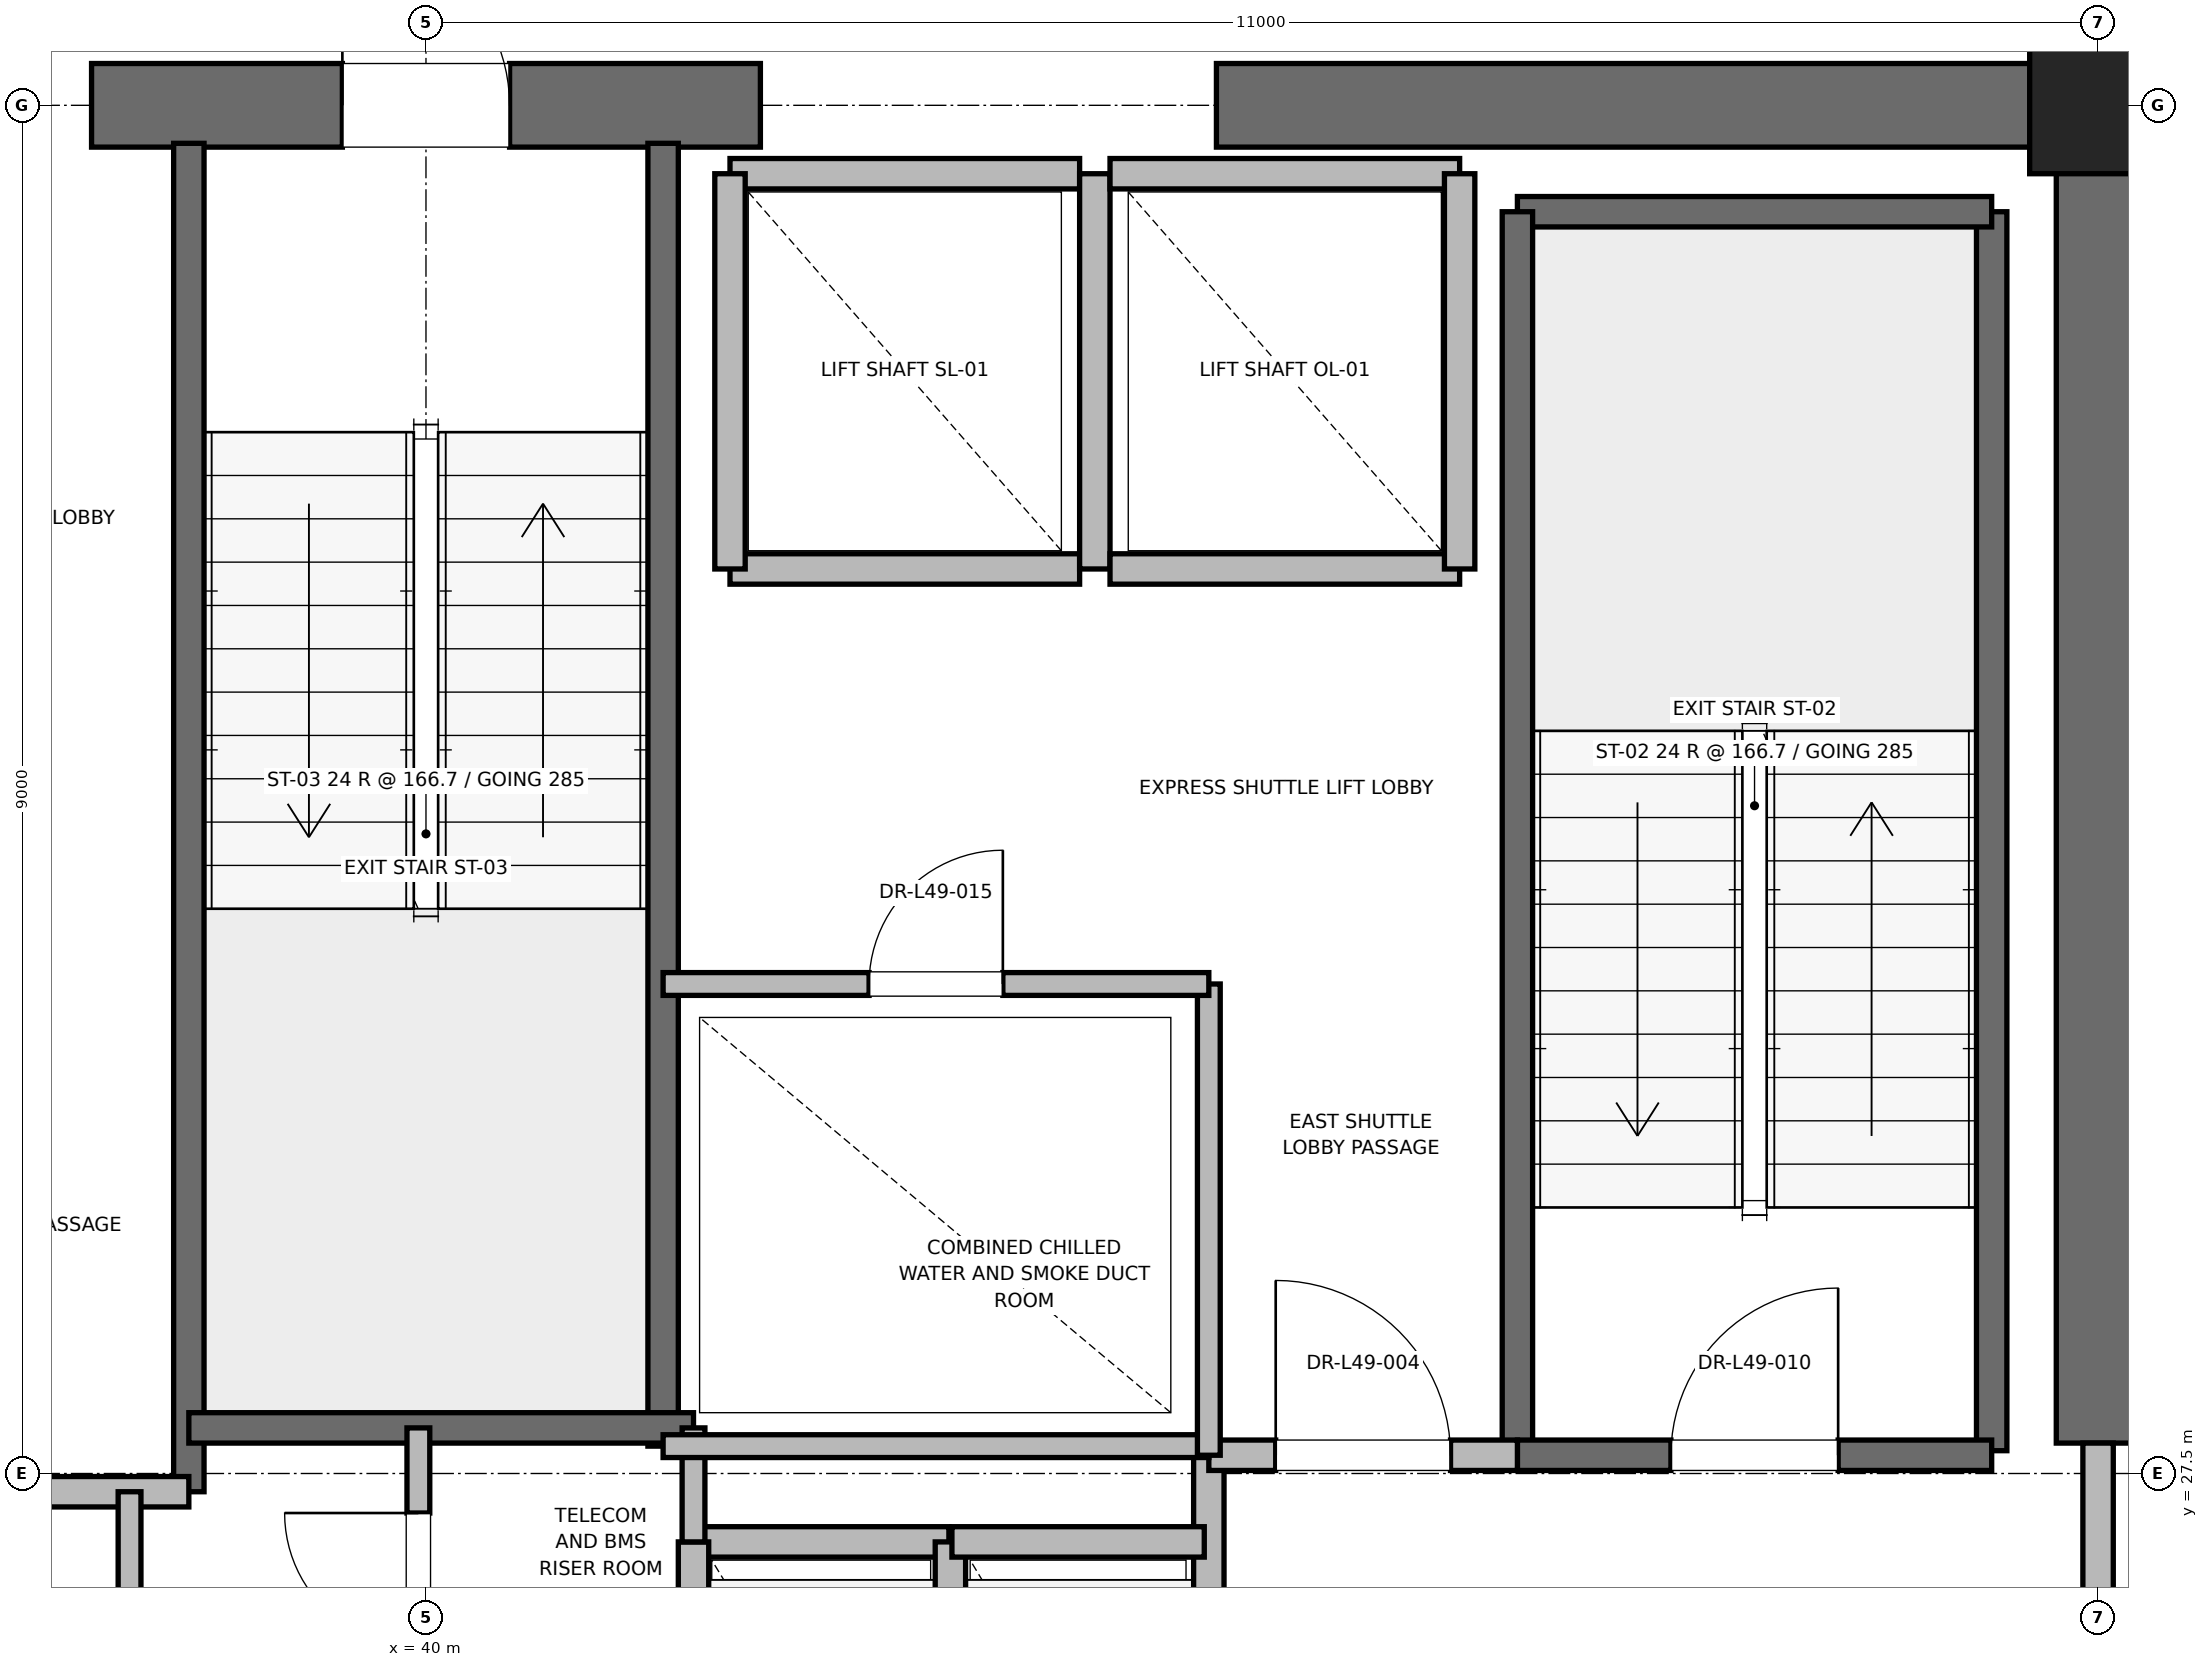
"""IFC4 building model, lengths in metres.
Left out: names, types, materials, properties, quantities, classifications, styles, units other than length and angle.
Written with IfcOpenShell. Run it as: python <this file> out.ifc"""

import sys

from ifc_helpers import new_model, si_unit, direction, frame, frame_2d, origin, origin_2d, place, context, subcontext, project, spatial, rectangle, extrude, element, fill, save


model = new_model("IFC4")
c1 = context("Model", 3, precision=1e-05, world=origin(), true_north=direction((0.0, 1.0)))
c2 = subcontext(c1, "Body", "Model", "MODEL_VIEW")
j1 = project(units=[si_unit("LENGTHUNIT", "METRE"), si_unit("PLANEANGLEUNIT", "RADIAN")], contexts=[c1])
p1 = place(None, origin())
s1 = spatial("IfcSite", under=j1, at=p1, CompositionType="ELEMENT")
p2 = place(p1, origin())
s2 = spatial("IfcBuilding", under=s1, at=p2, CompositionType="ELEMENT")
p3 = place(p2, frame((0.0, 0.0, 213.2)))
s3 = spatial("IfcBuildingStorey", under=s2, at=p3, CompositionType="ELEMENT", Elevation=213.2)
p4 = place(p3, frame((51.0, 36.5, 0.0), z_axis=(0.0, 0.0, 1.0), x_axis=(1.0, 0.0, 0.0)))
e1 = element("IfcColumn", 1, at=p4, inside=s3, PredefinedType="PILASTER", context=c2, shape_type="SweptSolid", body=[
    extrude(rectangle(XDim=0.9, YDim=0.9, at=origin_2d()), origin(), (0.0, 0.0, 1.0), 4.0),
])
p5 = place(p3, frame((37.8, 36.5, 0.0), z_axis=(0.0, 0.0, 1.0), x_axis=(1.0, 0.0, 0.0)))
e2 = element("IfcWall", 2, at=p5, inside=s3, PredefinedType="SHEAR", context=c2, shape_type="SweptSolid", body=[
    extrude(rectangle(XDim=4.4, YDim=0.55, at=frame_2d((2.2, 0.0))), origin(), (0.0, 0.0, 1.0), 3.775),
])
p6 = place(p5, frame((1.65, 0.0, 0.0)))
e3 = element("IfcOpeningElement", 3, at=p6, cuts=e2, PredefinedType="OPENING", context=c2, shape_type="SweptSolid", body=[
    extrude(rectangle(XDim=1.1, YDim=2.15, at=frame_2d((0.55, 1.075))), frame((0.0, 0.275, 0.0), z_axis=(0.0, -1.0, 0.0), x_axis=(1.0, 0.0, 0.0)), (0.0, 0.0, 1.0), 0.55),
])
p7 = place(p3, frame((45.2, 36.5, 0.0), z_axis=(0.0, 0.0, 1.0), x_axis=(1.0, 0.0, 0.0)))
e4 = element("IfcWall", 4, at=p7, inside=s3, PredefinedType="SHEAR", context=c2, shape_type="SweptSolid", body=[
    extrude(rectangle(XDim=5.8, YDim=0.55, at=frame_2d((2.9, 0.0))), origin(), (0.0, 0.0, 1.0), 3.775),
])
p8 = place(p3, frame((51.0, 27.7, 0.0), z_axis=(0.0, 0.0, 1.0), x_axis=(0.0, 1.0, 0.0)))
e5 = element("IfcWall", 5, at=p8, inside=s3, PredefinedType="SHEAR", context=c2, shape_type="SweptSolid", body=[
    extrude(rectangle(XDim=8.8, YDim=0.55, at=frame_2d((4.4, 0.0))), origin(), (0.0, 0.0, 1.0), 3.775),
])
p9 = place(p3, frame((50.3, 27.65, 0.0), z_axis=(0.0, 0.0, 1.0), x_axis=(0.0, 1.0, 0.0)))
e6 = element("IfcWall", 6, at=p9, inside=s3, PredefinedType="SOLIDWALL", context=c2, shape_type="SweptSolid", body=[
    extrude(rectangle(XDim=8.15, YDim=0.2, at=frame_2d((4.075, 0.0))), origin(), (0.0, 0.0, 1.0), 3.775),
])
p10 = place(p3, frame((47.18, 35.8, 0.0), z_axis=(0.0, 0.0, 1.0), x_axis=(1.0, 0.0, 0.0)))
e7 = element("IfcWall", 7, at=p10, inside=s3, PredefinedType="SOLIDWALL", context=c2, shape_type="SweptSolid", body=[
    extrude(rectangle(XDim=3.12, YDim=0.2, at=frame_2d((1.56, 0.0))), origin(), (0.0, 0.0, 1.0), 3.775),
])
p11 = place(p3, frame((47.18, 27.62, 0.0), z_axis=(0.0, 0.0, 1.0), x_axis=(0.0, 1.0, 0.0)))
e8 = element("IfcWall", 8, at=p11, inside=s3, PredefinedType="SOLIDWALL", context=c2, shape_type="SweptSolid", body=[
    extrude(rectangle(XDim=8.18, YDim=0.2, at=frame_2d((4.09, 0.0))), origin(), (0.0, 0.0, 1.0), 3.775),
])
p12 = place(p3, frame((47.18, 27.62, 0.0), z_axis=(0.0, 0.0, 1.0), x_axis=(1.0, 0.0, 0.0)))
e9 = element("IfcWall", 9, at=p12, inside=s3, PredefinedType="SOLIDWALL", context=c2, shape_type="SweptSolid", body=[
    extrude(rectangle(XDim=3.12, YDim=0.2, at=frame_2d((1.56, 0.0))), origin(), (0.0, 0.0, 1.0), 3.775),
])
p13 = place(p12, frame((1.01, 0.0, 0.0)))
e10 = element("IfcOpeningElement", 10, at=p13, cuts=e9, PredefinedType="OPENING", context=c2, shape_type="SweptSolid", body=[
    extrude(rectangle(XDim=1.1, YDim=2.15, at=frame_2d((0.55, 1.075))), frame((0.0, 0.1, 0.0), z_axis=(0.0, -1.0, 0.0), x_axis=(1.0, 0.0, 0.0)), (0.0, 0.0, 1.0), 0.2),
])
p14 = place(p3, frame((38.44, 27.38, 0.0), z_axis=(0.0, 0.0, 1.0), x_axis=(0.0, 1.0, 0.0)))
e11 = element("IfcWall", 11, at=p14, inside=s3, PredefinedType="SOLIDWALL", context=c2, shape_type="SweptSolid", body=[
    extrude(rectangle(XDim=8.87, YDim=0.2, at=frame_2d((4.435, 0.0))), origin(), (0.0, 0.0, 1.0), 3.775),
])
p15 = place(p3, frame((41.56, 27.68, 0.0), z_axis=(0.0, 0.0, 1.0), x_axis=(0.0, 1.0, 0.0)))
e12 = element("IfcWall", 12, at=p15, inside=s3, PredefinedType="SOLIDWALL", context=c2, shape_type="SweptSolid", body=[
    extrude(rectangle(XDim=8.57, YDim=0.2, at=frame_2d((4.285, 0.0))), origin(), (0.0, 0.0, 1.0), 3.775),
])
p16 = place(p3, frame((38.44, 27.8, 0.0), z_axis=(0.0, 0.0, 1.0), x_axis=(1.0, 0.0, 0.0)))
e13 = element("IfcWall", 13, at=p16, inside=s3, PredefinedType="SOLIDWALL", context=c2, shape_type="SweptSolid", body=[
    extrude(rectangle(XDim=3.32, YDim=0.2, at=frame_2d((1.66, 0.0))), origin(), (0.0, 0.0, 1.0), 3.775),
])
p17 = place(p3, frame((32.82, 27.38, 0.0), z_axis=(0.0, 0.0, 1.0), x_axis=(1.0, 0.0, 0.0)))
e14 = element("IfcWall", 14, at=p17, inside=s3, PredefinedType="PARTITIONING", context=c2, shape_type="SweptSolid", body=[
    extrude(rectangle(XDim=5.62, YDim=0.2, at=frame_2d((2.81, 0.0))), origin(), (0.0, 0.0, 1.0), 3.775),
])
p18 = place(p3, frame((45.15, 24.25, 0.0), z_axis=(0.0, 0.0, 1.0), x_axis=(0.0, 1.0, 0.0)))
e15 = element("IfcWall", 15, at=p18, inside=s3, PredefinedType="PARTITIONING", context=c2, shape_type="SweptSolid", body=[
    extrude(rectangle(XDim=3.37, YDim=0.2, at=frame_2d((1.685, 0.0))), origin(), (0.0, 0.0, 1.0), 3.775),
])
p19 = place(p3, frame((45.15, 27.62, 0.0), z_axis=(0.0, 0.0, 1.0), x_axis=(1.0, 0.0, 0.0)))
e16 = element("IfcWall", 16, at=p19, inside=s3, PredefinedType="PARTITIONING", context=c2, shape_type="SweptSolid", body=[
    extrude(rectangle(XDim=2.03, YDim=0.2, at=frame_2d((1.015, 0.0))), origin(), (0.0, 0.0, 1.0), 3.775),
])
p20 = place(p19, frame((0.44, 0.0, 0.0)))
e17 = element("IfcOpeningElement", 17, at=p20, cuts=e16, PredefinedType="OPENING", context=c2, shape_type="SweptSolid", body=[
    extrude(rectangle(XDim=1.15, YDim=2.2, at=frame_2d((0.575, 1.1))), frame((0.0, 0.1, 0.0), z_axis=(0.0, -1.0, 0.0), x_axis=(1.0, 0.0, 0.0)), (0.0, 0.0, 1.0), 0.2),
])
p21 = place(p3, frame((51.0, 24.3, 0.0), z_axis=(0.0, 0.0, 1.0), x_axis=(0.0, 1.0, 0.0)))
e18 = element("IfcWall", 18, at=p21, inside=s3, PredefinedType="PARTITIONING", context=c2, shape_type="SweptSolid", body=[
    extrude(rectangle(XDim=3.4, YDim=0.2, at=frame_2d((1.7, 0.0))), origin(), (0.0, 0.0, 1.0), 2.755),
])
p22 = place(p21, frame((1.125, 0.0, 0.0)))
e19 = element("IfcOpeningElement", 19, at=p22, cuts=e18, PredefinedType="OPENING", context=c2, shape_type="SweptSolid", body=[
    extrude(rectangle(XDim=1.15, YDim=2.2, at=frame_2d((0.575, 1.1))), frame((0.0, 0.1, 0.0), z_axis=(0.0, -1.0, 0.0), x_axis=(1.0, 0.0, 0.0)), (0.0, 0.0, 1.0), 0.2),
])
p23 = place(p3, frame((43.44, 27.05, 0.0), z_axis=(0.0, 0.0, 1.0), x_axis=(-1.0, 0.0, 0.0)))
e20 = element("IfcWall", 20, at=p23, inside=s3, PredefinedType="SOLIDWALL", context=c2, shape_type="SweptSolid", body=[
    extrude(rectangle(XDim=1.68, YDim=0.2, at=frame_2d((0.84, 0.0))), origin(), (0.0, 0.0, 1.0), 3.775),
])
for number, where, z_axis, x_axis in (
    (21, (41.76, 27.05, 0.0), (0.0, 0.0, 1.0), (0.0, -1.0, 0.0)),
    (22, (43.45, 24.45, 0.0), (0.0, 0.0, 1.0), (0.0, 1.0, 0.0)),
):
    element("IfcWall", number, at=place(p3, frame(where, z_axis=z_axis, x_axis=x_axis)), inside=s3, PredefinedType="SOLIDWALL", context=c2, shape_type="SweptSolid", body=[
        extrude(rectangle(XDim=2.6, YDim=0.2, at=frame_2d((1.3, 0.0))), origin(), (0.0, 0.0, 1.0), 3.775),
    ])
p24 = place(p3, frame((45.12, 27.05, 0.0), z_axis=(0.0, 0.0, 1.0), x_axis=(-1.0, 0.0, 0.0)))
e23 = element("IfcWall", 23, at=p24, inside=s3, PredefinedType="SOLIDWALL", context=c2, shape_type="SweptSolid", body=[
    extrude(rectangle(XDim=1.66, YDim=0.2, at=frame_2d((0.83, 0.0))), origin(), (0.0, 0.0, 1.0), 3.775),
])
p25 = place(p3, frame((42.0, 33.45, 0.0), z_axis=(0.0, 0.0, 1.0), x_axis=(1.0, 0.0, 0.0)))
e24 = element("IfcWall", 24, at=p25, inside=s3, PredefinedType="SOLIDWALL", context=c2, shape_type="SweptSolid", body=[
    extrude(rectangle(XDim=2.3, YDim=0.2, at=frame_2d((1.15, 0.0))), origin(), (0.0, 0.0, 1.0), 3.775),
])
p26 = place(p3, frame((44.3, 36.05, 0.0), z_axis=(0.0, 0.0, 1.0), x_axis=(-1.0, 0.0, 0.0)))
e25 = element("IfcWall", 25, at=p26, inside=s3, PredefinedType="SOLIDWALL", context=c2, shape_type="SweptSolid", body=[
    extrude(rectangle(XDim=2.3, YDim=0.2, at=frame_2d((1.15, 0.0))), origin(), (0.0, 0.0, 1.0), 2.755),
])
for number, where, z_axis, x_axis in (
    (26, (42.0, 36.05, 0.0), (0.0, 0.0, 1.0), (0.0, -1.0, 0.0)),
    (27, (44.4, 33.45, 0.0), (0.0, 0.0, 1.0), (0.0, 1.0, 0.0)),
):
    element("IfcWall", number, at=place(p3, frame(where, z_axis=z_axis, x_axis=x_axis)), inside=s3, PredefinedType="SOLIDWALL", context=c2, shape_type="SweptSolid", body=[
        extrude(rectangle(XDim=2.6, YDim=0.2, at=frame_2d((1.3, 0.0))), origin(), (0.0, 0.0, 1.0), 2.755),
    ])
p27 = place(p3, frame((44.5, 33.45, 0.0), z_axis=(0.0, 0.0, 1.0), x_axis=(1.0, 0.0, 0.0)))
e28 = element("IfcWall", 28, at=p27, inside=s3, PredefinedType="SOLIDWALL", context=c2, shape_type="SweptSolid", body=[
    extrude(rectangle(XDim=2.3, YDim=0.2, at=frame_2d((1.15, 0.0))), origin(), (0.0, 0.0, 1.0), 3.775),
])
p28 = place(p3, frame((46.8, 36.05, 0.0), z_axis=(0.0, 0.0, 1.0), x_axis=(-1.0, 0.0, 0.0)))
e29 = element("IfcWall", 29, at=p28, inside=s3, PredefinedType="SOLIDWALL", context=c2, shape_type="SweptSolid", body=[
    extrude(rectangle(XDim=2.3, YDim=0.2, at=frame_2d((1.15, 0.0))), origin(), (0.0, 0.0, 1.0), 2.755),
])
p29 = place(p3, frame((46.8, 33.45, 0.0), z_axis=(0.0, 0.0, 1.0), x_axis=(0.0, 1.0, 0.0)))
e30 = element("IfcWall", 30, at=p29, inside=s3, PredefinedType="SOLIDWALL", context=c2, shape_type="SweptSolid", body=[
    extrude(rectangle(XDim=2.6, YDim=0.2, at=frame_2d((1.3, 0.0))), origin(), (0.0, 0.0, 1.0), 3.775),
])
p30 = place(p3, frame((41.76, 27.05, 0.0), z_axis=(0.0, 0.0, 1.0), x_axis=(0.0, 1.0, 0.0)))
e31 = element("IfcWall", 31, at=p30, inside=s3, PredefinedType="PARTITIONING", context=c2, shape_type="SweptSolid", body=[
    extrude(rectangle(XDim=0.75, YDim=0.15, at=frame_2d((0.375, 0.0))), origin(), (0.0, 0.0, 1.0), 2.85),
])
p31 = place(p3, frame((39.95, 25.8, 0.0), z_axis=(0.0, 0.0, 1.0), x_axis=(0.0, 1.0, 0.0)))
e32 = element("IfcWall", 32, at=p31, inside=s3, PredefinedType="PARTITIONING", context=c2, shape_type="SweptSolid", body=[
    extrude(rectangle(XDim=2.0, YDim=0.15, at=frame_2d((1.0, 0.0))), origin(), (0.0, 0.0, 1.0), 2.85),
])
p32 = place(p31, frame((0.56, 0.0, 0.0)))
e33 = element("IfcOpeningElement", 33, at=p32, cuts=e32, PredefinedType="OPENING", context=c2, shape_type="SweptSolid", body=[
    extrude(rectangle(XDim=0.88, YDim=2.1, at=frame_2d((0.44, 1.05))), frame((0.0, 0.075, 0.0), z_axis=(0.0, -1.0, 0.0), x_axis=(1.0, 0.0, 0.0)), (0.0, 0.0, 1.0), 0.15),
])
p33 = place(p3, frame((38.05, 18.6, 0.0), z_axis=(0.0, 0.0, 1.0), x_axis=(0.0, 1.0, 0.0)))
e34 = element("IfcWall", 34, at=p33, inside=s3, PredefinedType="PARTITIONING", context=c2, shape_type="SweptSolid", body=[
    extrude(rectangle(XDim=8.78, YDim=0.15, at=frame_2d((4.39, 0.0))), origin(), (0.0, 0.0, 1.0), 2.755),
])
p34 = place(p33, frame((3.89, 0.0, 0.0)))
e35 = element("IfcOpeningElement", 35, at=p34, cuts=e34, PredefinedType="OPENING", context=c2, shape_type="SweptSolid", body=[
    extrude(rectangle(XDim=1.0, YDim=2.15, at=frame_2d((0.5, 1.075))), frame((0.0, 0.075, 0.0), z_axis=(0.0, -1.0, 0.0), x_axis=(1.0, 0.0, 0.0)), (0.0, 0.0, 1.0), 0.15),
])
p35 = place(p3, frame((41.56, 27.68, 0.0), z_axis=(0.0, 0.0, 1.0), x_axis=(1.0, 0.0, 0.0)))
e36 = element("IfcWall", 36, at=p35, inside=s3, PredefinedType="PARTITIONING", context=c2, shape_type="SweptSolid", body=[
    extrude(rectangle(XDim=3.59, YDim=0.15, at=frame_2d((1.795, 0.0))), origin(), (0.0, 0.0, 1.0), 2.85),
])
p36 = place(p3, frame((45.15, 27.62, 0.0), z_axis=(0.0, 0.0, 1.0), x_axis=(0.0, 1.0, 0.0)))
e37 = element("IfcWall", 37, at=p36, inside=s3, PredefinedType="PARTITIONING", context=c2, shape_type="SweptSolid", body=[
    extrude(rectangle(XDim=3.1, YDim=0.15, at=frame_2d((1.55, 0.0))), origin(), (0.0, 0.0, 1.0), 2.85),
])
p37 = place(p3, frame((41.56, 30.72, 0.0), z_axis=(0.0, 0.0, 1.0), x_axis=(1.0, 0.0, 0.0)))
e38 = element("IfcWall", 38, at=p37, inside=s3, PredefinedType="PARTITIONING", context=c2, shape_type="SweptSolid", body=[
    extrude(rectangle(XDim=3.59, YDim=0.15, at=frame_2d((1.795, 0.0))), origin(), (0.0, 0.0, 1.0), 2.85),
])
p38 = place(p37, frame((1.355, 0.0, 0.0)))
e39 = element("IfcOpeningElement", 39, at=p38, cuts=e38, PredefinedType="OPENING", context=c2, shape_type="SweptSolid", body=[
    extrude(rectangle(XDim=0.88, YDim=2.1, at=frame_2d((0.44, 1.05))), frame((0.0, 0.075, 0.0), z_axis=(0.0, -1.0, 0.0), x_axis=(1.0, 0.0, 0.0)), (0.0, 0.0, 1.0), 0.15),
])
p39 = place(p13, origin())
e40 = element("IfcDoor", 40, at=p39, inside=s3, OperationType="SINGLE_SWING_RIGHT", PredefinedType="DOOR", context=c2, shape_type="SweptSolid", body=[
    extrude(rectangle(XDim=1.1, YDim=2.15, at=frame_2d((0.55, 1.075))), frame((0.0, 0.025, 0.0), z_axis=(0.0, -1.0, 0.0), x_axis=(1.0, 0.0, 0.0)), (0.0, 0.0, 1.0), 0.05),
])
fill(e10, e40)
p40 = place(p6, origin())
e41 = element("IfcDoor", 41, at=p40, inside=s3, OperationType="SINGLE_SWING_LEFT", PredefinedType="DOOR", context=c2, shape_type="SweptSolid", body=[
    extrude(rectangle(XDim=1.1, YDim=2.15, at=frame_2d((0.55, 1.075))), frame((0.0, 0.025, 0.0), z_axis=(0.0, -1.0, 0.0), x_axis=(1.0, 0.0, 0.0)), (0.0, 0.0, 1.0), 0.05),
])
fill(e3, e41)
p41 = place(p20, origin())
e42 = element("IfcDoor", 42, at=p41, inside=s3, OperationType="SINGLE_SWING_LEFT", PredefinedType="DOOR", context=c2, shape_type="SweptSolid", body=[
    extrude(rectangle(XDim=1.15, YDim=2.2, at=frame_2d((0.575, 1.1))), frame((0.0, 0.025, 0.0), z_axis=(0.0, -1.0, 0.0), x_axis=(1.0, 0.0, 0.0)), (0.0, 0.0, 1.0), 0.05),
])
fill(e17, e42)
p42 = place(p32, origin())
e43 = element("IfcDoor", 43, at=p42, inside=s3, OperationType="SINGLE_SWING_RIGHT", PredefinedType="DOOR", context=c2, shape_type="SweptSolid", body=[
    extrude(rectangle(XDim=0.88, YDim=2.1, at=frame_2d((0.44, 1.05))), frame((0.0, 0.025, 0.0), z_axis=(0.0, -1.0, 0.0), x_axis=(1.0, 0.0, 0.0)), (0.0, 0.0, 1.0), 0.05),
])
fill(e33, e43)
p43 = place(p38, origin())
e44 = element("IfcDoor", 44, at=p43, inside=s3, OperationType="SINGLE_SWING_RIGHT", PredefinedType="DOOR", context=c2, shape_type="SweptSolid", body=[
    extrude(rectangle(XDim=0.88, YDim=2.1, at=frame_2d((0.44, 1.05))), frame((0.0, 0.025, 0.0), z_axis=(0.0, -1.0, 0.0), x_axis=(1.0, 0.0, 0.0)), (0.0, 0.0, 1.0), 0.05),
])
fill(e39, e44)
save(model, sys.argv[1])
